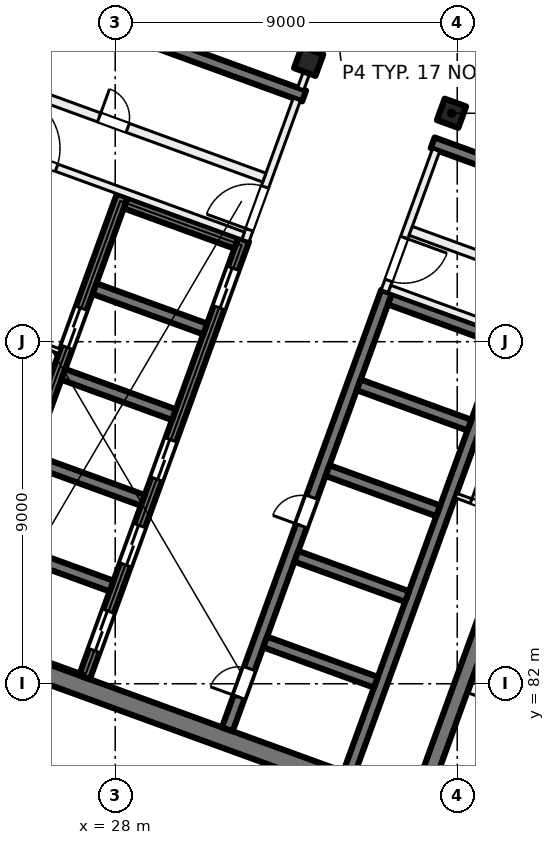
"""IFC4 building model, lengths in metres.
Left out: names, types, materials, properties, quantities, classifications, styles, units other than length and angle.
Written with IfcOpenShell. Run it as: python <this file> out.ifc"""

import sys

from ifc_helpers import new_model, si_unit, direction, frame, frame_2d, origin, origin_2d, place, context, subcontext, project, spatial, rectangle, extrude, element, fill, save


model = new_model("IFC4")
c1 = context("Model", 3, precision=1e-05, world=origin(), true_north=direction((0.0, 1.0)))
c2 = subcontext(c1, "Body", "Model", "MODEL_VIEW")
j1 = project(units=[si_unit("LENGTHUNIT", "METRE"), si_unit("PLANEANGLEUNIT", "RADIAN")], contexts=[c1])
p1 = place(None, origin())
s1 = spatial("IfcSite", under=j1, at=p1, CompositionType="ELEMENT")
p2 = place(p1, origin())
s2 = spatial("IfcBuilding", under=s1, at=p2, CompositionType="ELEMENT")
p3 = place(p2, frame((0.0, 0.0, 220.0)))
s3 = spatial("IfcBuildingStorey", under=s2, at=p3, CompositionType="ELEMENT", Elevation=220.0)
for number, where, z_axis, x_axis in (
    (1, (36.849, 97.011, 0.0), (0.0, 0.0, 1.0), (-0.342, -0.94, 0.0)),
    (2, (33.091, 98.379, 0.0), (0.0, 0.0, 1.0), (-0.342, -0.94, 0.0)),
):
    element("IfcColumn", number, at=place(p3, frame(where, z_axis=z_axis, x_axis=x_axis)), inside=s3, PredefinedType="COLUMN", context=c2, shape_type="SweptSolid", body=[
        extrude(rectangle(XDim=0.6, YDim=0.6, at=origin_2d()), origin(), (0.0, 0.0, 1.0), 4.0),
    ])
p4 = place(p3, frame((35.75, 78.788, 0.0), z_axis=(0.0, 0.0, 1.0), x_axis=(-0.939692894512, 0.342019391267, 0.0)))
e3 = element("IfcWall", 3, at=p4, inside=s3, PredefinedType="SHEAR", context=c2, shape_type="SweptSolid", body=[
    extrude(rectangle(XDim=14.4, YDim=0.5, at=frame_2d((7.2, 0.0))), origin(), (0.0, 0.0, 1.0), 4.0),
])
p5 = place(p3, frame((36.058, 79.048, 0.0), z_axis=(0.0, 0.0, 1.0), x_axis=(0.342016982193, 0.939693771338, 0.0)))
e4 = element("IfcWall", 4, at=p5, inside=s3, PredefinedType="SHEAR", context=c2, shape_type="SweptSolid", body=[
    extrude(rectangle(XDim=7.8, YDim=0.4, at=frame_2d((3.9, 0.0))), origin(), (0.0, 0.0, 1.0), 4.0),
])
p6 = place(p3, frame((30.949, 80.801, 0.0), z_axis=(0.0, 0.0, 1.0), x_axis=(0.342016684409, 0.939693879721, 0.0)))
e5 = element("IfcWall", 5, at=p6, inside=s3, PredefinedType="SHEAR", context=c2, shape_type="SweptSolid", body=[
    extrude(rectangle(XDim=12.25, YDim=0.3, at=frame_2d((6.125, 0.0))), origin(), (0.0, 0.0, 1.0), 4.0),
])
p7 = place(p6, frame((0.9, 0.0, 0.0)))
e6 = element("IfcOpeningElement", 6, at=p7, cuts=e5, PredefinedType="OPENING", context=c2, shape_type="SweptSolid", body=[
    extrude(rectangle(XDim=0.8, YDim=2.1, at=frame_2d((0.4, 1.05))), frame((0.0, 0.16, 0.0), z_axis=(0.0, -1.0, 0.0), x_axis=(1.0, 0.0, 0.0)), (0.0, 0.0, 1.0), 0.32),
])
p8 = place(p6, frame((5.7, 0.0, 0.0)))
e7 = element("IfcOpeningElement", 7, at=p8, cuts=e5, PredefinedType="OPENING", context=c2, shape_type="SweptSolid", body=[
    extrude(rectangle(XDim=0.8, YDim=2.1, at=frame_2d((0.4, 1.05))), frame((0.0, 0.16, 0.0), z_axis=(0.0, -1.0, 0.0), x_axis=(1.0, 0.0, 0.0)), (0.0, 0.0, 1.0), 0.32),
])
p9 = place(p3, frame((34.144, 79.638, 0.0), z_axis=(0.0, 0.0, 1.0), x_axis=(0.342016684409, 0.939693879721, 0.0)))
e8 = element("IfcWall", 8, at=p9, inside=s3, PredefinedType="SHEAR", context=c2, shape_type="SweptSolid", body=[
    extrude(rectangle(XDim=12.25, YDim=0.3, at=frame_2d((6.125, 0.0))), origin(), (0.0, 0.0, 1.0), 4.0),
])
p10 = place(p3, frame((34.858, 82.039, 0.0), z_axis=(0.0, 0.0, 1.0), x_axis=(-0.939689908313, 0.342027595692, 0.0)))
e9 = element("IfcWall", 9, at=p10, inside=s3, PredefinedType="SHEAR", context=c2, shape_type="SweptSolid", body=[
    extrude(rectangle(XDim=3.1, YDim=0.3, at=frame_2d((1.55, 0.0))), origin(), (0.0, 0.0, 1.0), 4.0),
])
p11 = place(p3, frame((35.679, 84.294, 0.0), z_axis=(0.0, 0.0, 1.0), x_axis=(-0.939706007505, 0.341983361377, 0.0)))
e10 = element("IfcWall", 10, at=p11, inside=s3, PredefinedType="SHEAR", context=c2, shape_type="SweptSolid", body=[
    extrude(rectangle(XDim=3.1, YDim=0.3, at=frame_2d((1.55, 0.0))), origin(), (0.0, 0.0, 1.0), 4.0),
])
for number, where, z_axis, x_axis in (
    (11, (36.5, 86.549, 0.0), (0.0, 0.0, 1.0), (-0.94, 0.342, 0.0)),
    (12, (37.321, 88.805, 0.0), (0.0, 0.0, 1.0), (-0.94, 0.342, 0.0)),
    (13, (38.142, 91.06, 0.0), (0.0, 0.0, 1.0), (-0.94, 0.342, 0.0)),
):
    element("IfcWall", number, at=place(p3, frame(where, z_axis=z_axis, x_axis=x_axis)), inside=s3, PredefinedType="SHEAR", context=c2, shape_type="SweptSolid", body=[
        extrude(rectangle(XDim=3.1, YDim=0.3, at=frame_2d((1.55, 0.0))), origin(), (0.0, 0.0, 1.0), 4.0),
    ])
p12 = place(p3, frame((27.191, 82.169, 0.0), z_axis=(0.0, 0.0, 1.0), x_axis=(0.342016684409, 0.939693879721, 0.0)))
e14 = element("IfcWall", 14, at=p12, inside=s3, PredefinedType="SHEAR", context=c2, shape_type="SweptSolid", body=[
    extrude(rectangle(XDim=12.25, YDim=0.3, at=frame_2d((6.125, 0.0))), origin(), (0.0, 0.0, 1.0), 4.0),
])
p13 = place(p12, frame((0.75, 0.0, 0.0)))
e15 = element("IfcOpeningElement", 15, at=p13, cuts=e14, PredefinedType="OPENING", context=c2, shape_type="SweptSolid", body=[
    extrude(rectangle(XDim=1.1, YDim=2.1, at=frame_2d((0.55, 1.05))), frame((0.0, 0.16, 0.0), z_axis=(0.0, -1.0, 0.0), x_axis=(1.0, 0.0, 0.0)), (0.0, 0.0, 1.0), 0.32),
])
p14 = place(p12, frame((3.15, 0.0, 0.0)))
e16 = element("IfcOpeningElement", 16, at=p14, cuts=e14, PredefinedType="OPENING", context=c2, shape_type="SweptSolid", body=[
    extrude(rectangle(XDim=1.1, YDim=2.1, at=frame_2d((0.55, 1.05))), frame((0.0, 0.16, 0.0), z_axis=(0.0, -1.0, 0.0), x_axis=(1.0, 0.0, 0.0)), (0.0, 0.0, 1.0), 0.32),
])
p15 = place(p12, frame((5.55, 0.0, 0.0)))
e17 = element("IfcOpeningElement", 17, at=p15, cuts=e14, PredefinedType="OPENING", context=c2, shape_type="SweptSolid", body=[
    extrude(rectangle(XDim=1.1, YDim=2.1, at=frame_2d((0.55, 1.05))), frame((0.0, 0.16, 0.0), z_axis=(0.0, -1.0, 0.0), x_axis=(1.0, 0.0, 0.0)), (0.0, 0.0, 1.0), 0.32),
])
p16 = place(p12, frame((10.35, 0.0, 0.0)))
e18 = element("IfcOpeningElement", 18, at=p16, cuts=e14, PredefinedType="OPENING", context=c2, shape_type="SweptSolid", body=[
    extrude(rectangle(XDim=1.1, YDim=2.1, at=frame_2d((0.55, 1.05))), frame((0.0, 0.16, 0.0), z_axis=(0.0, -1.0, 0.0), x_axis=(1.0, 0.0, 0.0)), (0.0, 0.0, 1.0), 0.32),
])
p17 = place(p3, frame((23.996, 83.332, 0.0), z_axis=(0.0, 0.0, 1.0), x_axis=(0.342016684409, 0.939693879721, 0.0)))
e19 = element("IfcWall", 19, at=p17, inside=s3, PredefinedType="SHEAR", context=c2, shape_type="SweptSolid", body=[
    extrude(rectangle(XDim=12.25, YDim=0.3, at=frame_2d((6.125, 0.0))), origin(), (0.0, 0.0, 1.0), 4.0),
])
p18 = place(p17, frame((8.0, 0.0, 0.0)))
e20 = element("IfcOpeningElement", 20, at=p18, cuts=e19, PredefinedType="OPENING", context=c2, shape_type="SweptSolid", body=[
    extrude(rectangle(XDim=1.1, YDim=2.1, at=frame_2d((0.55, 1.05))), frame((0.0, 0.16, 0.0), z_axis=(0.0, -1.0, 0.0), x_axis=(1.0, 0.0, 0.0)), (0.0, 0.0, 1.0), 0.32),
])
for number, where, z_axis, x_axis in (
    (21, (27.905, 84.57, 0.0), (0.0, 0.0, 1.0), (-0.94, 0.342, 0.0)),
    (22, (28.726, 86.825, 0.0), (0.0, 0.0, 1.0), (-0.94, 0.342, 0.0)),
    (23, (29.546, 89.08, 0.0), (0.0, 0.0, 1.0), (-0.94, 0.342, 0.0)),
):
    element("IfcWall", number, at=place(p3, frame(where, z_axis=z_axis, x_axis=x_axis)), inside=s3, PredefinedType="SHEAR", context=c2, shape_type="SweptSolid", body=[
        extrude(rectangle(XDim=3.1, YDim=0.3, at=frame_2d((1.55, 0.0))), origin(), (0.0, 0.0, 1.0), 4.0),
    ])
for number, where, z_axis, x_axis in (
    (24, (30.367, 91.336, 0.0), (0.0, 0.0, 1.0), (-0.94, 0.342, 0.0)),
    (25, (31.188, 93.591, 0.0), (0.0, 0.0, 1.0), (-0.94, 0.342, 0.0)),
):
    element("IfcWall", number, at=place(p3, frame(where, z_axis=z_axis, x_axis=x_axis)), inside=s3, PredefinedType="SHEAR", context=c2, shape_type="SweptSolid", body=[
        extrude(rectangle(XDim=3.1, YDim=0.3, at=frame_2d((1.55, 0.0))), origin(), (0.0, 0.0, 1.0), 4.0),
    ])
p19 = place(p3, frame((44.529, 93.258, 0.0), z_axis=(0.0, 0.0, 1.0), x_axis=(-0.9396917844, 0.342022441267, 0.0)))
e26 = element("IfcWall", 26, at=p19, inside=s3, PredefinedType="SHEAR", context=c2, shape_type="SweptSolid", body=[
    extrude(rectangle(XDim=8.7, YDim=0.3, at=frame_2d((4.35, 0.0))), origin(), (0.0, 0.0, 1.0), 4.0),
])
p20 = place(p3, frame((32.971, 97.465, 0.0), z_axis=(0.0, 0.0, 1.0), x_axis=(-0.939695066972, 0.34201342241, 0.0)))
e27 = element("IfcWall", 27, at=p20, inside=s3, PredefinedType="SHEAR", context=c2, shape_type="SweptSolid", body=[
    extrude(rectangle(XDim=8.7, YDim=0.3, at=frame_2d((4.35, 0.0))), origin(), (0.0, 0.0, 1.0), 4.0),
])
p21 = place(p3, frame((31.427, 93.663, 0.0), z_axis=(0.0, 0.0, 1.0), x_axis=(0.342030870568, 0.93968871632, 0.0)))
e28 = element("IfcWall", 28, at=p21, inside=s3, PredefinedType="PARTITIONING", context=c2, shape_type="SweptSolid", body=[
    extrude(rectangle(XDim=3.95, YDim=0.2, at=frame_2d((1.975, 0.0))), origin(), (0.0, 0.0, 1.0), 3.625),
])
p22 = place(p21, frame((0.3, 0.0, 0.0)))
e29 = element("IfcOpeningElement", 29, at=p22, cuts=e28, PredefinedType="OPENING", context=c2, shape_type="SweptSolid", body=[
    extrude(rectangle(XDim=1.2, YDim=2.1, at=frame_2d((0.6, 1.05))), frame((0.0, 0.11, 0.0), z_axis=(0.0, -1.0, 0.0), x_axis=(1.0, 0.0, 0.0)), (0.0, 0.0, 1.0), 0.22),
])
p23 = place(p3, frame((23.427, 96.682, 0.0), z_axis=(0.0, 0.0, 1.0), x_axis=(0.939690465531, -0.342026064782, 0.0)))
e30 = element("IfcWall", 30, at=p23, inside=s3, PredefinedType="PARTITIONING", context=c2, shape_type="SweptSolid", body=[
    extrude(rectangle(XDim=8.45, YDim=0.2, at=frame_2d((4.225, 0.0))), origin(), (0.0, 0.0, 1.0), 3.625),
])
p24 = place(p23, frame((1.725, 0.0, 0.0)))
e31 = element("IfcOpeningElement", 31, at=p24, cuts=e30, PredefinedType="OPENING", context=c2, shape_type="SweptSolid", body=[
    extrude(rectangle(XDim=1.5, YDim=2.1, at=frame_2d((0.75, 1.05))), frame((0.0, 0.11, 0.0), z_axis=(0.0, -1.0, 0.0), x_axis=(1.0, 0.0, 0.0)), (0.0, 0.0, 1.0), 0.22),
])
p25 = place(p3, frame((23.983, 98.208, 0.0), z_axis=(0.0, 0.0, 1.0), x_axis=(0.939699751196, -0.342000552051, 0.0)))
e32 = element("IfcWall", 32, at=p25, inside=s3, PredefinedType="PARTITIONING", context=c2, shape_type="SweptSolid", body=[
    extrude(rectangle(XDim=8.45, YDim=0.25, at=frame_2d((4.225, 0.0))), origin(), (0.0, 0.0, 1.0), 3.625),
])
p26 = place(p25, frame((3.825, 0.0, 0.0)))
e33 = element("IfcOpeningElement", 33, at=p26, cuts=e32, PredefinedType="OPENING", context=c2, shape_type="SweptSolid", body=[
    extrude(rectangle(XDim=0.8, YDim=2.1, at=frame_2d((0.4, 1.05))), frame((0.0, 0.135, 0.0), z_axis=(0.0, -1.0, 0.0), x_axis=(1.0, 0.0, 0.0)), (0.0, 0.0, 1.0), 0.27),
])
p27 = place(p3, frame((24.985, 91.312, 0.0), z_axis=(0.0, 0.0, 1.0), x_axis=(0.939719959755, -0.341945020783, 0.0)))
e34 = element("IfcWall", 34, at=p27, inside=s3, PredefinedType="PARTITIONING", context=c2, shape_type="SweptSolid", body=[
    extrude(rectangle(XDim=1.65, YDim=0.125, at=frame_2d((0.825, 0.0))), origin(), (0.0, 0.0, 1.0), 3.625),
])
p28 = place(p27, frame((0.425, 0.0, 0.0)))
e35 = element("IfcOpeningElement", 35, at=p28, cuts=e34, PredefinedType="OPENING", context=c2, shape_type="SweptSolid", body=[
    extrude(rectangle(XDim=0.8, YDim=2.1, at=frame_2d((0.4, 1.05))), frame((0.0, 0.073, 0.0), z_axis=(0.0, -1.0, 0.0), x_axis=(1.0, 0.0, 0.0)), (0.0, 0.0, 1.0), 0.145),
])
p29 = place(p3, frame((36.443, 96.041, 0.0), z_axis=(0.0, 0.0, 1.0), x_axis=(-0.341996156931, -0.939701350773, 0.0)))
e36 = element("IfcWall", 36, at=p29, inside=s3, PredefinedType="PARTITIONING", context=c2, shape_type="SweptSolid", body=[
    extrude(rectangle(XDim=3.95, YDim=0.2, at=frame_2d((1.975, 0.0))), origin(), (0.0, 0.0, 1.0), 3.625),
])
p30 = place(p29, frame((2.45, 0.0, 0.0)))
e37 = element("IfcOpeningElement", 37, at=p30, cuts=e36, PredefinedType="OPENING", context=c2, shape_type="SweptSolid", body=[
    extrude(rectangle(XDim=1.2, YDim=2.1, at=frame_2d((0.6, 1.05))), frame((0.0, 0.11, 0.0), z_axis=(0.0, -1.0, 0.0), x_axis=(1.0, 0.0, 0.0)), (0.0, 0.0, 1.0), 0.22),
])
p31 = place(p3, frame((35.22, 92.389, 0.0), z_axis=(0.0, 0.0, 1.0), x_axis=(0.939690465531, -0.342026064782, 0.0)))
e38 = element("IfcWall", 38, at=p31, inside=s3, PredefinedType="PARTITIONING", context=c2, shape_type="SweptSolid", body=[
    extrude(rectangle(XDim=8.45, YDim=0.2, at=frame_2d((4.225, 0.0))), origin(), (0.0, 0.0, 1.0), 3.625),
])
p32 = place(p31, frame((5.225, 0.0, 0.0)))
e39 = element("IfcOpeningElement", 39, at=p32, cuts=e38, PredefinedType="OPENING", context=c2, shape_type="SweptSolid", body=[
    extrude(rectangle(XDim=1.5, YDim=2.1, at=frame_2d((0.75, 1.05))), frame((0.0, 0.11, 0.0), z_axis=(0.0, -1.0, 0.0), x_axis=(1.0, 0.0, 0.0)), (0.0, 0.0, 1.0), 0.22),
])
p33 = place(p3, frame((35.776, 93.916, 0.0), z_axis=(0.0, 0.0, 1.0), x_axis=(0.939690465531, -0.342026064782, 0.0)))
e40 = element("IfcWall", 40, at=p33, inside=s3, PredefinedType="PARTITIONING", context=c2, shape_type="SweptSolid", body=[
    extrude(rectangle(XDim=8.45, YDim=0.25, at=frame_2d((4.225, 0.0))), origin(), (0.0, 0.0, 1.0), 3.625),
])
p34 = place(p33, frame((2.39, 0.0, 0.0)))
e41 = element("IfcOpeningElement", 41, at=p34, cuts=e40, PredefinedType="OPENING", context=c2, shape_type="SweptSolid", body=[
    extrude(rectangle(XDim=0.8, YDim=2.1, at=frame_2d((0.4, 1.05))), frame((0.0, 0.135, 0.0), z_axis=(0.0, -1.0, 0.0), x_axis=(1.0, 0.0, 0.0)), (0.0, 0.0, 1.0), 0.27),
])
p35 = place(p33, frame((6.665, 0.0, 0.0)))
e42 = element("IfcOpeningElement", 42, at=p35, cuts=e40, PredefinedType="OPENING", context=c2, shape_type="SweptSolid", body=[
    extrude(rectangle(XDim=0.8, YDim=2.1, at=frame_2d((0.4, 1.05))), frame((0.0, 0.135, 0.0), z_axis=(0.0, -1.0, 0.0), x_axis=(1.0, 0.0, 0.0)), (0.0, 0.0, 1.0), 0.27),
])
p36 = place(p3, frame((36.966, 86.952, 0.0), z_axis=(0.0, 0.0, 1.0), x_axis=(0.939672407396, -0.342075674051, 0.0)))
e43 = element("IfcWall", 43, at=p36, inside=s3, PredefinedType="PARTITIONING", context=c2, shape_type="SweptSolid", body=[
    extrude(rectangle(XDim=1.65, YDim=0.125, at=frame_2d((0.825, 0.0))), origin(), (0.0, 0.0, 1.0), 3.625),
])
p37 = place(p36, frame((0.425, 0.0, 0.0)))
e44 = element("IfcOpeningElement", 44, at=p37, cuts=e43, PredefinedType="OPENING", context=c2, shape_type="SweptSolid", body=[
    extrude(rectangle(XDim=0.8, YDim=2.1, at=frame_2d((0.4, 1.05))), frame((0.0, 0.073, 0.0), z_axis=(0.0, -1.0, 0.0), x_axis=(1.0, 0.0, 0.0)), (0.0, 0.0, 1.0), 0.145),
])
p38 = place(p3, frame((32.881, 97.657, 0.0), z_axis=(0.0, 0.0, 1.0), x_axis=(0.342058204353, 0.939678766832, 0.0)))
e45 = element("IfcWall", 45, at=p38, inside=s3, PredefinedType="PARTITIONING", context=c2, shape_type="SweptSolid", body=[
    extrude(rectangle(XDim=5.163, YDim=0.175, at=frame_2d((2.581, 0.0))), origin(), (0.0, 0.0, 1.0), 3.625),
])
p39 = place(p38, frame((1.991, 0.0, 0.0)))
e46 = element("IfcOpeningElement", 46, at=p39, cuts=e45, PredefinedType="OPENING", context=c2, shape_type="SweptSolid", body=[
    extrude(rectangle(XDim=1.2, YDim=2.1, at=frame_2d((0.6, 1.05))), frame((0.0, 0.097, 0.0), z_axis=(0.0, -1.0, 0.0), x_axis=(1.0, 0.0, 0.0)), (0.0, 0.0, 1.0), 0.195),
])
p40 = place(p13, origin())
e47 = element("IfcDoor", 47, at=p40, inside=s3, OperationType="DOUBLE_DOOR_SLIDING", PredefinedType="DOOR", context=c2, shape_type="SweptSolid", body=[
    extrude(rectangle(XDim=1.1, YDim=2.1, at=frame_2d((0.55, 1.05))), frame((0.0, 0.025, 0.0), z_axis=(0.0, -1.0, 0.0), x_axis=(1.0, 0.0, 0.0)), (0.0, 0.0, 1.0), 0.05),
])
fill(e15, e47)
p41 = place(p14, origin())
e48 = element("IfcDoor", 48, at=p41, inside=s3, OperationType="DOUBLE_DOOR_SLIDING", PredefinedType="DOOR", context=c2, shape_type="SweptSolid", body=[
    extrude(rectangle(XDim=1.1, YDim=2.1, at=frame_2d((0.55, 1.05))), frame((0.0, 0.025, 0.0), z_axis=(0.0, -1.0, 0.0), x_axis=(1.0, 0.0, 0.0)), (0.0, 0.0, 1.0), 0.05),
])
fill(e16, e48)
p42 = place(p15, origin())
e49 = element("IfcDoor", 49, at=p42, inside=s3, OperationType="DOUBLE_DOOR_SLIDING", PredefinedType="DOOR", context=c2, shape_type="SweptSolid", body=[
    extrude(rectangle(XDim=1.1, YDim=2.1, at=frame_2d((0.55, 1.05))), frame((0.0, 0.025, 0.0), z_axis=(0.0, -1.0, 0.0), x_axis=(1.0, 0.0, 0.0)), (0.0, 0.0, 1.0), 0.05),
])
fill(e17, e49)
p43 = place(p16, origin())
e50 = element("IfcDoor", 50, at=p43, inside=s3, OperationType="DOUBLE_DOOR_SLIDING", PredefinedType="DOOR", context=c2, shape_type="SweptSolid", body=[
    extrude(rectangle(XDim=1.1, YDim=2.1, at=frame_2d((0.55, 1.05))), frame((0.0, 0.025, 0.0), z_axis=(0.0, -1.0, 0.0), x_axis=(1.0, 0.0, 0.0)), (0.0, 0.0, 1.0), 0.05),
])
fill(e18, e50)
p44 = place(p7, origin())
e51 = element("IfcDoor", 51, at=p44, inside=s3, OperationType="SINGLE_SWING_LEFT", PredefinedType="DOOR", context=c2, shape_type="SweptSolid", body=[
    extrude(rectangle(XDim=0.8, YDim=2.1, at=frame_2d((0.4, 1.05))), frame((0.0, 0.025, 0.0), z_axis=(0.0, -1.0, 0.0), x_axis=(1.0, 0.0, 0.0)), (0.0, 0.0, 1.0), 0.05),
])
fill(e6, e51)
p45 = place(p8, origin())
e52 = element("IfcDoor", 52, at=p45, inside=s3, OperationType="SINGLE_SWING_RIGHT", PredefinedType="DOOR", context=c2, shape_type="SweptSolid", body=[
    extrude(rectangle(XDim=0.8, YDim=2.1, at=frame_2d((0.4, 1.05))), frame((0.0, 0.025, 0.0), z_axis=(0.0, -1.0, 0.0), x_axis=(1.0, 0.0, 0.0)), (0.0, 0.0, 1.0), 0.05),
])
fill(e7, e52)
p46 = place(p22, origin())
e53 = element("IfcDoor", 53, at=p46, inside=s3, OperationType="DOUBLE_DOOR_SINGLE_SWING", PredefinedType="DOOR", context=c2, shape_type="SweptSolid", body=[
    extrude(rectangle(XDim=1.2, YDim=2.1, at=frame_2d((0.6, 1.05))), frame((0.0, 0.025, 0.0), z_axis=(0.0, -1.0, 0.0), x_axis=(1.0, 0.0, 0.0)), (0.0, 0.0, 1.0), 0.05),
])
fill(e29, e53)
p47 = place(p24, origin())
e54 = element("IfcDoor", 54, at=p47, inside=s3, OperationType="DOUBLE_DOOR_SINGLE_SWING", PredefinedType="DOOR", context=c2, shape_type="SweptSolid", body=[
    extrude(rectangle(XDim=1.5, YDim=2.1, at=frame_2d((0.75, 1.05))), frame((0.0, 0.025, 0.0), z_axis=(0.0, -1.0, 0.0), x_axis=(1.0, 0.0, 0.0)), (0.0, 0.0, 1.0), 0.05),
])
fill(e31, e54)
p48 = place(p26, origin())
e55 = element("IfcDoor", 55, at=p48, inside=s3, OperationType="SINGLE_SWING_LEFT", PredefinedType="DOOR", context=c2, shape_type="SweptSolid", body=[
    extrude(rectangle(XDim=0.8, YDim=2.1, at=frame_2d((0.4, 1.05))), frame((0.0, 0.025, 0.0), z_axis=(0.0, -1.0, 0.0), x_axis=(1.0, 0.0, 0.0)), (0.0, 0.0, 1.0), 0.05),
])
fill(e33, e55)
p49 = place(p30, origin())
e56 = element("IfcDoor", 56, at=p49, inside=s3, OperationType="DOUBLE_DOOR_SINGLE_SWING", PredefinedType="DOOR", context=c2, shape_type="SweptSolid", body=[
    extrude(rectangle(XDim=1.2, YDim=2.1, at=frame_2d((0.6, 1.05))), frame((0.0, 0.025, 0.0), z_axis=(0.0, -1.0, 0.0), x_axis=(1.0, 0.0, 0.0)), (0.0, 0.0, 1.0), 0.05),
])
fill(e37, e56)
p50 = place(p37, origin())
e57 = element("IfcDoor", 57, at=p50, inside=s3, OperationType="SINGLE_SWING_LEFT", PredefinedType="DOOR", context=c2, shape_type="SweptSolid", body=[
    extrude(rectangle(XDim=0.8, YDim=2.1, at=frame_2d((0.4, 1.05))), frame((0.0, 0.025, 0.0), z_axis=(0.0, -1.0, 0.0), x_axis=(1.0, 0.0, 0.0)), (0.0, 0.0, 1.0), 0.05),
])
fill(e44, e57)
p51 = place(p18, origin())
e58 = element("IfcDoor", 58, at=p51, inside=s3, OperationType="DOUBLE_DOOR_SLIDING", PredefinedType="DOOR", context=c2, shape_type="SweptSolid", body=[
    extrude(rectangle(XDim=1.1, YDim=2.1, at=frame_2d((0.55, 1.05))), frame((0.0, 0.025, 0.0), z_axis=(0.0, -1.0, 0.0), x_axis=(1.0, 0.0, 0.0)), (0.0, 0.0, 1.0), 0.05),
])
fill(e20, e58)
save(model, sys.argv[1])
